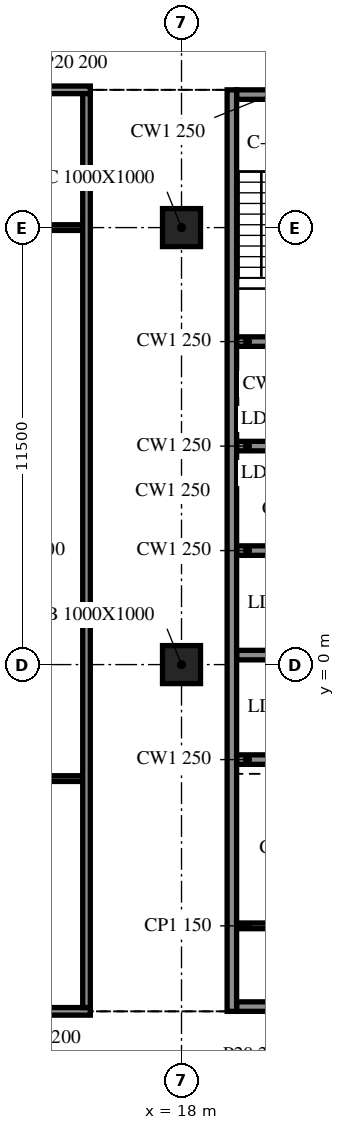
"""IFC4 building model, lengths in metres.
Left out: names, types, materials, properties, quantities, classifications, styles, units other than length and angle.
Written with IfcOpenShell. Run it as: python <this file> out.ifc"""

import sys

from ifc_helpers import new_model, si_unit, direction, frame, frame_2d, origin, origin_2d, place, context, subcontext, project, spatial, rectangle, extrude, element, save


model = new_model("IFC4")
c1 = context("Model", 3, precision=1e-05, world=origin(), true_north=direction((0.0, 1.0)))
c2 = subcontext(c1, "Body", "Model", "MODEL_VIEW")
j1 = project(units=[si_unit("LENGTHUNIT", "METRE"), si_unit("PLANEANGLEUNIT", "RADIAN")], contexts=[c1])
p1 = place(None, origin())
s1 = spatial("IfcSite", under=j1, at=p1, CompositionType="ELEMENT")
p2 = place(p1, origin())
s2 = spatial("IfcBuilding", under=s1, at=p2, CompositionType="ELEMENT")
p3 = place(p2, frame((0.0, 0.0, 236.2)))
s3 = spatial("IfcBuildingStorey", under=s2, at=p3, CompositionType="ELEMENT", Elevation=236.2)
for number, where, z_axis, x_axis in (
    (1, (18.0, 0.0, -0.34), (0.0, 0.0, 1.0), (1.0, 0.0, 0.0)),
    (2, (18.0, 11.5, -0.34), (0.0, 0.0, 1.0), (1.0, 0.0, 0.0)),
):
    element("IfcColumn", number, at=place(p3, frame(where, z_axis=z_axis, x_axis=x_axis)), inside=s3, PredefinedType="COLUMN", context=c2, shape_type="SweptSolid", body=[
        extrude(rectangle(XDim=1.0, YDim=1.0, at=origin_2d()), origin(), (0.0, 0.0, 1.0), 3.8),
    ])
p4 = place(p3, frame((19.325, 15.125, 0.0), z_axis=(0.0, 0.0, 1.0), x_axis=(0.0, -1.0, 0.0)))
e3 = element("IfcWall", 3, at=p4, inside=s3, PredefinedType="SOLIDWALL", context=c2, shape_type="SweptSolid", body=[
    extrude(rectangle(XDim=24.25, YDim=0.25, at=frame_2d((12.125, 0.0))), origin(), (0.0, 0.0, 1.0), 3.46),
])
p5 = place(p3, frame((28.55, -9.0, 0.0), z_axis=(0.0, 0.0, 1.0), x_axis=(-1.0, 0.0, 0.0)))
e4 = element("IfcWall", 4, at=p5, inside=s3, PredefinedType="SOLIDWALL", context=c2, shape_type="SweptSolid", body=[
    extrude(rectangle(XDim=9.1, YDim=0.25, at=frame_2d((4.55, 0.0))), origin(), (0.0, 0.0, 1.0), 3.46),
])
p6 = place(p5, frame((3.65, 0.0, 0.0)))
e5 = element("IfcOpeningElement", 5, at=p6, cuts=e4, PredefinedType="OPENING", context=c2, shape_type="SweptSolid", body=[
    extrude(rectangle(XDim=1.8, YDim=2.1, at=frame_2d((0.9, 1.05))), frame((0.0, 0.135, 0.0), z_axis=(0.0, -1.0, 0.0), x_axis=(1.0, 0.0, 0.0)), (0.0, 0.0, 1.0), 0.27),
])
p7 = place(p3, frame((19.45, 15.0, 0.0), z_axis=(0.0, 0.0, 1.0), x_axis=(1.0, 0.0, 0.0)))
e6 = element("IfcWall", 6, at=p7, inside=s3, PredefinedType="SOLIDWALL", context=c2, shape_type="SweptSolid", body=[
    extrude(rectangle(XDim=9.1, YDim=0.25, at=frame_2d((4.55, 0.0))), origin(), (0.0, 0.0, 1.0), 3.46),
])
p8 = place(p7, frame((3.65, 0.0, 0.0)))
e7 = element("IfcOpeningElement", 7, at=p8, cuts=e6, PredefinedType="OPENING", context=c2, shape_type="SweptSolid", body=[
    extrude(rectangle(XDim=1.8, YDim=2.1, at=frame_2d((0.9, 1.05))), frame((0.0, 0.135, 0.0), z_axis=(0.0, -1.0, 0.0), x_axis=(1.0, 0.0, 0.0)), (0.0, 0.0, 1.0), 0.27),
])
for number, where, z_axis, x_axis in (
    (8, (19.45, -2.5, 0.0), (0.0, 0.0, 1.0), (1.0, 0.0, 0.0)),
    (9, (19.45, 0.25, 0.0), (0.0, 0.0, 1.0), (1.0, 0.0, 0.0)),
    (10, (19.45, 3.0, 0.0), (0.0, 0.0, 1.0), (1.0, 0.0, 0.0)),
    (11, (19.45, 5.75, 0.0), (0.0, 0.0, 1.0), (1.0, 0.0, 0.0)),
    (12, (19.45, 8.5, 0.0), (0.0, 0.0, 1.0), (1.0, 0.0, 0.0)),
):
    element("IfcWall", number, at=place(p3, frame(where, z_axis=z_axis, x_axis=x_axis)), inside=s3, PredefinedType="SOLIDWALL", context=c2, shape_type="SweptSolid", body=[
        extrude(rectangle(XDim=2.85, YDim=0.25, at=frame_2d((1.425, 0.0))), origin(), (0.0, 0.0, 1.0), 3.46),
    ])
p9 = place(p3, frame((19.45, -6.875, 0.0), z_axis=(0.0, 0.0, 1.0), x_axis=(1.0, 0.0, 0.0)))
e13 = element("IfcWall", 13, at=p9, inside=s3, PredefinedType="PARTITIONING", context=c2, shape_type="SweptSolid", body=[
    extrude(rectangle(XDim=2.85, YDim=0.15, at=frame_2d((1.425, 0.0))), origin(), (0.0, 0.0, 1.0), 3.46),
])
p10 = place(p3, frame((8.3, -9.125, 0.0), z_axis=(0.0, 0.0, 1.0), x_axis=(1.0, 0.0, 0.0)))
e14 = element("IfcWall", 14, at=p10, inside=s3, PredefinedType="PARTITIONING", context=c2, shape_type="SweptSolid", body=[
    extrude(rectangle(XDim=7.3, YDim=0.2, at=frame_2d((3.65, 0.0))), origin(), (0.0, 0.0, 1.0), 3.46),
])
p11 = place(p10, frame((3.1, 0.0, 0.0)))
e15 = element("IfcOpeningElement", 15, at=p11, cuts=e14, PredefinedType="OPENING", context=c2, shape_type="SweptSolid", body=[
    extrude(rectangle(XDim=0.9, YDim=2.1, at=frame_2d((0.45, 1.05))), frame((0.0, 0.11, 0.0), z_axis=(0.0, -1.0, 0.0), x_axis=(1.0, 0.0, 0.0)), (0.0, 0.0, 1.0), 0.22),
])
for number, where, z_axis, x_axis in (
    (16, (8.5, -3.0, 0.0), (0.0, 0.0, 1.0), (1.0, 0.0, 0.0)),
    (17, (8.5, 11.5, 0.0), (0.0, 0.0, 1.0), (1.0, 0.0, 0.0)),
):
    element("IfcWall", number, at=place(p3, frame(where, z_axis=z_axis, x_axis=x_axis)), inside=s3, PredefinedType="PARTITIONING", context=c2, shape_type="SweptSolid", body=[
        extrude(rectangle(XDim=6.9, YDim=0.15, at=frame_2d((3.45, 0.0))), origin(), (0.0, 0.0, 1.0), 3.46),
    ])
p12 = place(p3, frame((8.3, 15.125, 0.0), z_axis=(0.0, 0.0, 1.0), x_axis=(1.0, 0.0, 0.0)))
e18 = element("IfcWall", 18, at=p12, inside=s3, PredefinedType="PARTITIONING", context=c2, shape_type="SweptSolid", body=[
    extrude(rectangle(XDim=7.3, YDim=0.2, at=frame_2d((3.65, 0.0))), origin(), (0.0, 0.0, 1.0), 3.46),
])
p13 = place(p12, frame((3.1, 0.0, 0.0)))
e19 = element("IfcOpeningElement", 19, at=p13, cuts=e18, PredefinedType="OPENING", context=c2, shape_type="SweptSolid", body=[
    extrude(rectangle(XDim=0.9, YDim=2.1, at=frame_2d((0.45, 1.05))), frame((0.0, 0.11, 0.0), z_axis=(0.0, -1.0, 0.0), x_axis=(1.0, 0.0, 0.0)), (0.0, 0.0, 1.0), 0.22),
])
p14 = place(p3, frame((15.5, -9.025, 0.0), z_axis=(0.0, 0.0, 1.0), x_axis=(0.0, 1.0, 0.0)))
e20 = element("IfcWall", 20, at=p14, inside=s3, PredefinedType="PARTITIONING", context=c2, shape_type="SweptSolid", body=[
    extrude(rectangle(XDim=24.05, YDim=0.2, at=frame_2d((12.025, 0.0))), origin(), (0.0, 0.0, 1.0), 3.46),
])
save(model, sys.argv[1])
